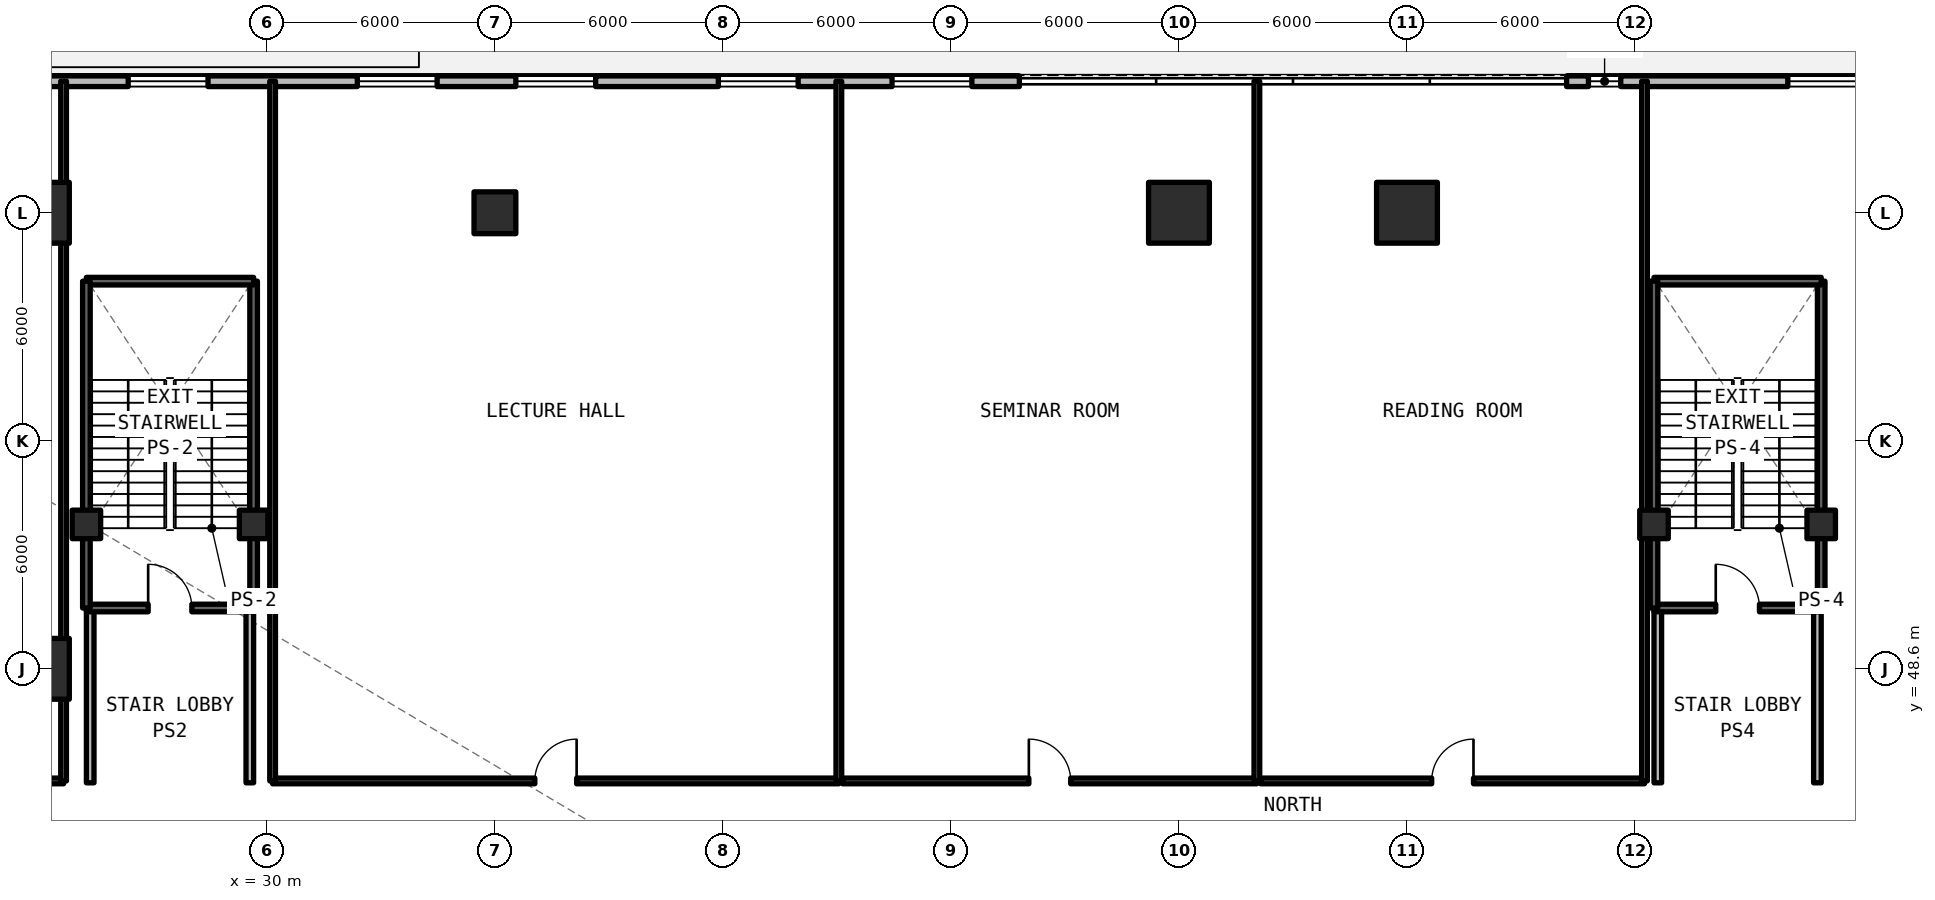
"""IFC4 building model, lengths in metres.
Left out: names, types, materials, properties, quantities, classifications, styles, units other than length and angle.
Written with IfcOpenShell. Run it as: python <this file> out.ifc"""

import sys

from ifc_helpers import new_model, si_unit, direction, frame, frame_2d, origin, origin_2d, place, context, subcontext, project, spatial, rectangle, circle, extrude, element, fill, save


model = new_model("IFC4")
c1 = context("Model", 3, precision=1e-05, world=origin(), true_north=direction((0.0, 1.0)))
c2 = subcontext(c1, "Body", "Model", "MODEL_VIEW")
j1 = project(units=[si_unit("LENGTHUNIT", "METRE"), si_unit("PLANEANGLEUNIT", "RADIAN")], contexts=[c1])
p1 = place(None, origin())
s1 = spatial("IfcSite", under=j1, at=p1, CompositionType="ELEMENT")
p2 = place(p1, origin())
s2 = spatial("IfcBuilding", under=s1, at=p2, CompositionType="ELEMENT")
p3 = place(p2, frame((0.0, 0.0, 14.85)))
s3 = spatial("IfcBuildingStorey", under=s2, at=p3, CompositionType="ELEMENT", Elevation=14.85)
p4 = place(p3, frame((24.0, 60.6, 0.0), z_axis=(0.0, 0.0, 1.0), x_axis=(1.0, 0.0, 0.0)))
e1 = element("IfcColumn", 1, at=p4, inside=s3, PredefinedType="COLUMN", context=c2, shape_type="SweptSolid", body=[
    extrude(rectangle(XDim=1.6, YDim=1.6, at=origin_2d()), origin(), (0.0, 0.0, 1.0), 4.62),
])
p5 = place(p3, frame((36.0, 60.6, 0.0), z_axis=(0.0, 0.0, 1.0), x_axis=(1.0, 0.0, 0.0)))
e2 = element("IfcColumn", 2, at=p5, inside=s3, PredefinedType="COLUMN", context=c2, shape_type="SweptSolid", body=[
    extrude(circle(Radius=0.55, at=origin_2d()), origin(), (0.0, 0.0, 1.0), 4.62),
])
for number, where, z_axis, x_axis in (
    (3, (54.0, 60.6, 0.0), (0.0, 0.0, 1.0), (1.0, 0.0, 0.0)),
    (4, (60.0, 60.6, 0.0), (0.0, 0.0, 1.0), (1.0, 0.0, 0.0)),
    (5, (24.0, 48.6, 0.0), (0.0, 0.0, 1.0), (1.0, 0.0, 0.0)),
):
    element("IfcColumn", number, at=place(p3, frame(where, z_axis=z_axis, x_axis=x_axis)), inside=s3, PredefinedType="COLUMN", context=c2, shape_type="SweptSolid", body=[
        extrude(rectangle(XDim=1.6, YDim=1.6, at=origin_2d()), origin(), (0.0, 0.0, 1.0), 4.62),
    ])
for number, where, z_axis, x_axis in (
    (6, (25.25, 52.4, 0.0), (0.0, 0.0, 1.0), (1.0, 0.0, 0.0)),
    (7, (29.65, 52.4, 0.0), (0.0, 0.0, 1.0), (1.0, 0.0, 0.0)),
    (8, (66.5, 52.4, 0.0), (0.0, 0.0, 1.0), (1.0, 0.0, 0.0)),
    (9, (70.9, 52.4, 0.0), (0.0, 0.0, 1.0), (1.0, 0.0, 0.0)),
):
    element("IfcColumn", number, at=place(p3, frame(where, z_axis=z_axis, x_axis=x_axis)), inside=s3, PredefinedType="COLUMN", context=c2, shape_type="SweptSolid", body=[
        extrude(rectangle(XDim=0.75, YDim=0.75, at=origin_2d()), origin(), (0.0, 0.0, 1.0), 4.62),
    ])
p6 = place(p3, frame((106.442, 64.06, 0.0), z_axis=(0.0, 0.0, 1.0), x_axis=(-1.0, 0.0, 0.0)))
e10 = element("IfcWall", 10, at=p6, inside=s3, PredefinedType="SOLIDWALL", context=c2, shape_type="SweptSolid", body=[
    extrude(rectangle(XDim=42.242, YDim=0.28, at=frame_2d((21.121, 0.0))), origin(), (0.0, 0.0, 1.0), 4.34),
])
p7 = place(p6, frame((7.75, 0.0, 0.0)))
e11 = element("IfcOpeningElement", 11, at=p7, cuts=e10, PredefinedType="OPENING", context=c2, shape_type="SweptSolid", body=[
    extrude(rectangle(XDim=1.5, YDim=2.2, at=frame_2d((0.75, 1.1))), frame((0.0, 0.15, 0.0), z_axis=(0.0, -1.0, 0.0), x_axis=(1.0, 0.0, 0.0)), (0.0, 0.0, 1.0), 0.3),
])
p8 = place(p6, frame((40.817, 0.0, 0.78)))
e12 = element("IfcOpeningElement", 12, at=p8, cuts=e10, PredefinedType="OPENING", context=c2, shape_type="SweptSolid", body=[
    extrude(rectangle(XDim=0.85, YDim=1.65, at=frame_2d((0.425, 0.825))), frame((0.0, 0.15, 0.0), z_axis=(0.0, -1.0, 0.0), x_axis=(1.0, 0.0, 0.0)), (0.0, 0.0, 1.0), 0.3),
])
p9 = place(p6, frame((15.321, 0.0, 0.78)))
e13 = element("IfcOpeningElement", 13, at=p9, cuts=e10, PredefinedType="OPENING", context=c2, shape_type="SweptSolid", body=[
    extrude(rectangle(XDim=2.1, YDim=1.66, at=frame_2d((1.05, 0.83))), frame((0.0, 0.15, 0.0), z_axis=(0.0, -1.0, 0.0), x_axis=(1.0, 0.0, 0.0)), (0.0, 0.0, 1.0), 0.3),
])
p10 = place(p6, frame((24.821, 0.0, 0.78)))
e14 = element("IfcOpeningElement", 14, at=p10, cuts=e10, PredefinedType="OPENING", context=c2, shape_type="SweptSolid", body=[
    extrude(rectangle(XDim=2.1, YDim=1.66, at=frame_2d((1.05, 0.83))), frame((0.0, 0.15, 0.0), z_axis=(0.0, -1.0, 0.0), x_axis=(1.0, 0.0, 0.0)), (0.0, 0.0, 1.0), 0.3),
])
p11 = place(p6, frame((34.321, 0.0, 0.78)))
e15 = element("IfcOpeningElement", 15, at=p11, cuts=e10, PredefinedType="OPENING", context=c2, shape_type="SweptSolid", body=[
    extrude(rectangle(XDim=2.1, YDim=1.66, at=frame_2d((1.05, 0.83))), frame((0.0, 0.15, 0.0), z_axis=(0.0, -1.0, 0.0), x_axis=(1.0, 0.0, 0.0)), (0.0, 0.0, 1.0), 0.3),
])
p12 = place(p3, frame((49.8, 64.06, 0.0), z_axis=(0.0, 0.0, 1.0), x_axis=(-1.0, 0.0, 0.0)))
e16 = element("IfcWall", 16, at=p12, inside=s3, PredefinedType="SOLIDWALL", context=c2, shape_type="SweptSolid", body=[
    extrude(rectangle(XDim=42.242, YDim=0.28, at=frame_2d((21.121, 0.0))), origin(), (0.0, 0.0, 1.0), 4.34),
])
p13 = place(p12, frame((32.25, 0.0, 0.78)))
e17 = element("IfcOpeningElement", 17, at=p13, cuts=e16, PredefinedType="OPENING", context=c2, shape_type="SweptSolid", body=[
    extrude(rectangle(XDim=2.1, YDim=1.66, at=frame_2d((1.05, 0.83))), frame((0.0, 0.15, 0.0), z_axis=(0.0, -1.0, 0.0), x_axis=(1.0, 0.0, 0.0)), (0.0, 0.0, 1.0), 0.3),
])
p14 = place(p12, frame((11.15, 0.0, 0.78)))
e18 = element("IfcOpeningElement", 18, at=p14, cuts=e16, PredefinedType="OPENING", context=c2, shape_type="SweptSolid", body=[
    extrude(rectangle(XDim=2.1, YDim=1.66, at=frame_2d((1.05, 0.83))), frame((0.0, 0.15, 0.0), z_axis=(0.0, -1.0, 0.0), x_axis=(1.0, 0.0, 0.0)), (0.0, 0.0, 1.0), 0.3),
])
p15 = place(p12, frame((1.25, 0.0, 0.78)))
e19 = element("IfcOpeningElement", 19, at=p15, cuts=e16, PredefinedType="OPENING", context=c2, shape_type="SweptSolid", body=[
    extrude(rectangle(XDim=2.1, YDim=1.66, at=frame_2d((1.05, 0.83))), frame((0.0, 0.15, 0.0), z_axis=(0.0, -1.0, 0.0), x_axis=(1.0, 0.0, 0.0)), (0.0, 0.0, 1.0), 0.3),
])
p16 = place(p12, frame((21.35, 0.0, 0.78)))
e20 = element("IfcOpeningElement", 20, at=p16, cuts=e16, PredefinedType="OPENING", context=c2, shape_type="SweptSolid", body=[
    extrude(rectangle(XDim=2.1, YDim=1.66, at=frame_2d((1.05, 0.83))), frame((0.0, 0.15, 0.0), z_axis=(0.0, -1.0, 0.0), x_axis=(1.0, 0.0, 0.0)), (0.0, 0.0, 1.0), 0.3),
])
p17 = place(p12, frame((5.821, 0.0, 0.78)))
e21 = element("IfcOpeningElement", 21, at=p17, cuts=e16, PredefinedType="OPENING", context=c2, shape_type="SweptSolid", body=[
    extrude(rectangle(XDim=2.1, YDim=1.66, at=frame_2d((1.05, 0.83))), frame((0.0, 0.15, 0.0), z_axis=(0.0, -1.0, 0.0), x_axis=(1.0, 0.0, 0.0)), (0.0, 0.0, 1.0), 0.3),
])
p18 = place(p12, frame((15.321, 0.0, 0.78)))
e22 = element("IfcOpeningElement", 22, at=p18, cuts=e16, PredefinedType="OPENING", context=c2, shape_type="SweptSolid", body=[
    extrude(rectangle(XDim=2.1, YDim=1.66, at=frame_2d((1.05, 0.83))), frame((0.0, 0.15, 0.0), z_axis=(0.0, -1.0, 0.0), x_axis=(1.0, 0.0, 0.0)), (0.0, 0.0, 1.0), 0.3),
])
for number, where, z_axis, x_axis in (
    (23, (25.35, 45.6, 0.0), (0.0, 0.0, 1.0), (0.0, 1.0, 0.0)),
    (24, (29.55, 45.6, 0.0), (0.0, 0.0, 1.0), (0.0, 1.0, 0.0)),
    (25, (66.6, 45.6, 0.0), (0.0, 0.0, 1.0), (0.0, 1.0, 0.0)),
    (26, (70.8, 45.6, 0.0), (0.0, 0.0, 1.0), (0.0, 1.0, 0.0)),
):
    element("IfcWall", number, at=place(p3, frame(where, z_axis=z_axis, x_axis=x_axis)), inside=s3, PredefinedType="SOLIDWALL", context=c2, shape_type="SweptSolid", body=[
        extrude(rectangle(XDim=4.6, YDim=0.2, at=frame_2d((2.3, 0.0))), origin(), (0.0, 0.0, 1.0), 3.56),
    ])
p19 = place(p3, frame((8.35, 45.65, 0.0), z_axis=(0.0, 0.0, 1.0), x_axis=(1.0, 0.0, 0.0)))
e27 = element("IfcWall", 27, at=p19, inside=s3, PredefinedType="SOLIDWALL", context=c2, shape_type="SweptSolid", body=[
    extrude(rectangle(XDim=16.3, YDim=0.15, at=frame_2d((8.15, 0.0))), origin(), (0.0, 0.0, 1.0), 3.56),
])
p20 = place(p19, frame((7.6, 0.0, 0.0)))
e28 = element("IfcOpeningElement", 28, at=p20, cuts=e27, PredefinedType="OPENING", context=c2, shape_type="SweptSolid", body=[
    extrude(rectangle(XDim=1.1, YDim=2.15, at=frame_2d((0.55, 1.075))), frame((0.0, 0.085, 0.0), z_axis=(0.0, -1.0, 0.0), x_axis=(1.0, 0.0, 0.0)), (0.0, 0.0, 1.0), 0.17),
])
p21 = place(p3, frame((24.65, 45.65, 0.0), z_axis=(0.0, 0.0, 1.0), x_axis=(0.0, 1.0, 0.0)))
e29 = element("IfcWall", 29, at=p21, inside=s3, PredefinedType="SOLIDWALL", context=c2, shape_type="SweptSolid", body=[
    extrude(rectangle(XDim=18.41, YDim=0.15, at=frame_2d((9.205, 0.0))), origin(), (0.0, 0.0, 1.0), 3.56),
])
p22 = place(p3, frame((30.15, 45.65, 0.0), z_axis=(0.0, 0.0, 1.0), x_axis=(1.0, 0.0, 0.0)))
e30 = element("IfcWall", 30, at=p22, inside=s3, PredefinedType="SOLIDWALL", context=c2, shape_type="SweptSolid", body=[
    extrude(rectangle(XDim=14.9, YDim=0.15, at=frame_2d((7.45, 0.0))), origin(), (0.0, 0.0, 1.0), 3.56),
])
p23 = place(p22, frame((6.9, 0.0, 0.0)))
e31 = element("IfcOpeningElement", 31, at=p23, cuts=e30, PredefinedType="OPENING", context=c2, shape_type="SweptSolid", body=[
    extrude(rectangle(XDim=1.1, YDim=2.15, at=frame_2d((0.55, 1.075))), frame((0.0, 0.085, 0.0), z_axis=(0.0, -1.0, 0.0), x_axis=(1.0, 0.0, 0.0)), (0.0, 0.0, 1.0), 0.17),
])
for number, where, z_axis, x_axis in (
    (32, (30.15, 45.65, 0.0), (0.0, 0.0, 1.0), (0.0, 1.0, 0.0)),
    (33, (45.05, 45.65, 0.0), (0.0, 0.0, 1.0), (0.0, 1.0, 0.0)),
):
    element("IfcWall", number, at=place(p3, frame(where, z_axis=z_axis, x_axis=x_axis)), inside=s3, PredefinedType="SOLIDWALL", context=c2, shape_type="SweptSolid", body=[
        extrude(rectangle(XDim=18.41, YDim=0.15, at=frame_2d((9.205, 0.0))), origin(), (0.0, 0.0, 1.0), 3.56),
    ])
p24 = place(p3, frame((45.15, 45.65, 0.0), z_axis=(0.0, 0.0, 1.0), x_axis=(1.0, 0.0, 0.0)))
e34 = element("IfcWall", 34, at=p24, inside=s3, PredefinedType="SOLIDWALL", context=c2, shape_type="SweptSolid", body=[
    extrude(rectangle(XDim=10.9, YDim=0.15, at=frame_2d((5.45, 0.0))), origin(), (0.0, 0.0, 1.0), 3.56),
])
p25 = place(p24, frame((4.9, 0.0, 0.0)))
e35 = element("IfcOpeningElement", 35, at=p25, cuts=e34, PredefinedType="OPENING", context=c2, shape_type="SweptSolid", body=[
    extrude(rectangle(XDim=1.1, YDim=2.15, at=frame_2d((0.55, 1.075))), frame((0.0, 0.085, 0.0), z_axis=(0.0, -1.0, 0.0), x_axis=(1.0, 0.0, 0.0)), (0.0, 0.0, 1.0), 0.17),
])
p26 = place(p3, frame((56.05, 45.65, 0.0), z_axis=(0.0, 0.0, 1.0), x_axis=(0.0, 1.0, 0.0)))
e36 = element("IfcWall", 36, at=p26, inside=s3, PredefinedType="SOLIDWALL", context=c2, shape_type="SweptSolid", body=[
    extrude(rectangle(XDim=18.41, YDim=0.15, at=frame_2d((9.205, 0.0))), origin(), (0.0, 0.0, 1.0), 3.56),
])
p27 = place(p3, frame((56.15, 45.65, 0.0), z_axis=(0.0, 0.0, 1.0), x_axis=(1.0, 0.0, 0.0)))
e37 = element("IfcWall", 37, at=p27, inside=s3, PredefinedType="SOLIDWALL", context=c2, shape_type="SweptSolid", body=[
    extrude(rectangle(XDim=10.1, YDim=0.15, at=frame_2d((5.05, 0.0))), origin(), (0.0, 0.0, 1.0), 3.56),
])
p28 = place(p27, frame((4.5, 0.0, 0.0)))
e38 = element("IfcOpeningElement", 38, at=p28, cuts=e37, PredefinedType="OPENING", context=c2, shape_type="SweptSolid", body=[
    extrude(rectangle(XDim=1.1, YDim=2.15, at=frame_2d((0.55, 1.075))), frame((0.0, 0.085, 0.0), z_axis=(0.0, -1.0, 0.0), x_axis=(1.0, 0.0, 0.0)), (0.0, 0.0, 1.0), 0.17),
])
p29 = place(p3, frame((66.25, 45.65, 0.0), z_axis=(0.0, 0.0, 1.0), x_axis=(0.0, 1.0, 0.0)))
e39 = element("IfcWall", 39, at=p29, inside=s3, PredefinedType="SOLIDWALL", context=c2, shape_type="SweptSolid", body=[
    extrude(rectangle(XDim=18.41, YDim=0.15, at=frame_2d((9.205, 0.0))), origin(), (0.0, 0.0, 1.0), 3.56),
])
p30 = place(p3, frame((25.25, 50.2, 0.0), z_axis=(0.0, 0.0, 1.0), x_axis=(1.0, 0.0, 0.0)))
e40 = element("IfcWall", 40, at=p30, inside=s3, PredefinedType="SOLIDWALL", context=c2, shape_type="SweptSolid", body=[
    extrude(rectangle(XDim=4.4, YDim=0.2, at=frame_2d((2.2, 0.0))), origin(), (0.0, 0.0, 1.0), 4.62),
])
p31 = place(p30, frame((1.625, 0.0, 0.0)))
e41 = element("IfcOpeningElement", 41, at=p31, cuts=e40, PredefinedType="OPENING", context=c2, shape_type="SweptSolid", body=[
    extrude(rectangle(XDim=1.15, YDim=2.15, at=frame_2d((0.575, 1.075))), frame((0.0, 0.11, 0.0), z_axis=(0.0, -1.0, 0.0), x_axis=(1.0, 0.0, 0.0)), (0.0, 0.0, 1.0), 0.22),
])
p32 = place(p3, frame((29.65, 50.2, 0.0), z_axis=(0.0, 0.0, 1.0), x_axis=(0.0, 1.0, 0.0)))
e42 = element("IfcWall", 42, at=p32, inside=s3, PredefinedType="SOLIDWALL", context=c2, shape_type="SweptSolid", body=[
    extrude(rectangle(XDim=8.6, YDim=0.2, at=frame_2d((4.3, 0.0))), origin(), (0.0, 0.0, 1.0), 4.62),
])
p33 = place(p3, frame((29.65, 58.8, 0.0), z_axis=(0.0, 0.0, 1.0), x_axis=(-1.0, 0.0, 0.0)))
e43 = element("IfcWall", 43, at=p33, inside=s3, PredefinedType="SOLIDWALL", context=c2, shape_type="SweptSolid", body=[
    extrude(rectangle(XDim=4.4, YDim=0.2, at=frame_2d((2.2, 0.0))), origin(), (0.0, 0.0, 1.0), 4.62),
])
p34 = place(p3, frame((25.25, 58.8, 0.0), z_axis=(0.0, 0.0, 1.0), x_axis=(0.0, -1.0, 0.0)))
e44 = element("IfcWall", 44, at=p34, inside=s3, PredefinedType="SOLIDWALL", context=c2, shape_type="SweptSolid", body=[
    extrude(rectangle(XDim=8.6, YDim=0.2, at=frame_2d((4.3, 0.0))), origin(), (0.0, 0.0, 1.0), 4.62),
])
p35 = place(p3, frame((66.5, 50.2, 0.0), z_axis=(0.0, 0.0, 1.0), x_axis=(1.0, 0.0, 0.0)))
e45 = element("IfcWall", 45, at=p35, inside=s3, PredefinedType="SOLIDWALL", context=c2, shape_type="SweptSolid", body=[
    extrude(rectangle(XDim=4.4, YDim=0.2, at=frame_2d((2.2, 0.0))), origin(), (0.0, 0.0, 1.0), 4.62),
])
p36 = place(p35, frame((1.625, 0.0, 0.0)))
e46 = element("IfcOpeningElement", 46, at=p36, cuts=e45, PredefinedType="OPENING", context=c2, shape_type="SweptSolid", body=[
    extrude(rectangle(XDim=1.15, YDim=2.15, at=frame_2d((0.575, 1.075))), frame((0.0, 0.11, 0.0), z_axis=(0.0, -1.0, 0.0), x_axis=(1.0, 0.0, 0.0)), (0.0, 0.0, 1.0), 0.22),
])
p37 = place(p3, frame((70.9, 50.2, 0.0), z_axis=(0.0, 0.0, 1.0), x_axis=(0.0, 1.0, 0.0)))
e47 = element("IfcWall", 47, at=p37, inside=s3, PredefinedType="SOLIDWALL", context=c2, shape_type="SweptSolid", body=[
    extrude(rectangle(XDim=8.6, YDim=0.2, at=frame_2d((4.3, 0.0))), origin(), (0.0, 0.0, 1.0), 4.62),
])
p38 = place(p3, frame((70.9, 58.8, 0.0), z_axis=(0.0, 0.0, 1.0), x_axis=(-1.0, 0.0, 0.0)))
e48 = element("IfcWall", 48, at=p38, inside=s3, PredefinedType="SOLIDWALL", context=c2, shape_type="SweptSolid", body=[
    extrude(rectangle(XDim=4.4, YDim=0.2, at=frame_2d((2.2, 0.0))), origin(), (0.0, 0.0, 1.0), 4.62),
])
p39 = place(p3, frame((66.5, 58.8, 0.0), z_axis=(0.0, 0.0, 1.0), x_axis=(0.0, -1.0, 0.0)))
e49 = element("IfcWall", 49, at=p39, inside=s3, PredefinedType="SOLIDWALL", context=c2, shape_type="SweptSolid", body=[
    extrude(rectangle(XDim=8.6, YDim=0.2, at=frame_2d((4.3, 0.0))), origin(), (0.0, 0.0, 1.0), 4.62),
])
p40 = place(p8, origin())
e50 = element("IfcWindow", 50, at=p40, inside=s3, PartitioningType="SINGLE_PANEL", PredefinedType="WINDOW", context=c2, shape_type="SweptSolid", body=[
    extrude(rectangle(XDim=0.85, YDim=1.65, at=frame_2d((0.425, 0.825))), frame((0.0, 0.03, 0.0), z_axis=(0.0, -1.0, 0.0), x_axis=(1.0, 0.0, 0.0)), (0.0, 0.0, 1.0), 0.06),
])
fill(e12, e50)
p41 = place(p11, origin())
e51 = element("IfcWindow", 51, at=p41, inside=s3, PartitioningType="SINGLE_PANEL", PredefinedType="WINDOW", context=c2, shape_type="SweptSolid", body=[
    extrude(rectangle(XDim=2.1, YDim=1.66, at=frame_2d((1.05, 0.83))), frame((0.0, 0.03, 0.0), z_axis=(0.0, -1.0, 0.0), x_axis=(1.0, 0.0, 0.0)), (0.0, 0.0, 1.0), 0.06),
])
fill(e15, e51)
p42 = place(p14, origin())
e52 = element("IfcWindow", 52, at=p42, inside=s3, PartitioningType="SINGLE_PANEL", PredefinedType="WINDOW", context=c2, shape_type="SweptSolid", body=[
    extrude(rectangle(XDim=2.1, YDim=1.66, at=frame_2d((1.05, 0.83))), frame((0.0, 0.03, 0.0), z_axis=(0.0, -1.0, 0.0), x_axis=(1.0, 0.0, 0.0)), (0.0, 0.0, 1.0), 0.06),
])
fill(e18, e52)
p43 = place(p15, origin())
e53 = element("IfcWindow", 53, at=p43, inside=s3, PartitioningType="SINGLE_PANEL", PredefinedType="WINDOW", context=c2, shape_type="SweptSolid", body=[
    extrude(rectangle(XDim=2.1, YDim=1.66, at=frame_2d((1.05, 0.83))), frame((0.0, 0.03, 0.0), z_axis=(0.0, -1.0, 0.0), x_axis=(1.0, 0.0, 0.0)), (0.0, 0.0, 1.0), 0.06),
])
fill(e19, e53)
p44 = place(p16, origin())
e54 = element("IfcWindow", 54, at=p44, inside=s3, PartitioningType="SINGLE_PANEL", PredefinedType="WINDOW", context=c2, shape_type="SweptSolid", body=[
    extrude(rectangle(XDim=2.1, YDim=1.66, at=frame_2d((1.05, 0.83))), frame((0.0, 0.03, 0.0), z_axis=(0.0, -1.0, 0.0), x_axis=(1.0, 0.0, 0.0)), (0.0, 0.0, 1.0), 0.06),
])
fill(e20, e54)
p45 = place(p17, origin())
e55 = element("IfcWindow", 55, at=p45, inside=s3, PartitioningType="SINGLE_PANEL", PredefinedType="WINDOW", context=c2, shape_type="SweptSolid", body=[
    extrude(rectangle(XDim=2.1, YDim=1.66, at=frame_2d((1.05, 0.83))), frame((0.0, 0.03, 0.0), z_axis=(0.0, -1.0, 0.0), x_axis=(1.0, 0.0, 0.0)), (0.0, 0.0, 1.0), 0.06),
])
fill(e21, e55)
p46 = place(p18, origin())
e56 = element("IfcWindow", 56, at=p46, inside=s3, PartitioningType="SINGLE_PANEL", PredefinedType="WINDOW", context=c2, shape_type="SweptSolid", body=[
    extrude(rectangle(XDim=2.1, YDim=1.66, at=frame_2d((1.05, 0.83))), frame((0.0, 0.03, 0.0), z_axis=(0.0, -1.0, 0.0), x_axis=(1.0, 0.0, 0.0)), (0.0, 0.0, 1.0), 0.06),
])
fill(e22, e56)
p47 = place(p23, origin())
e57 = element("IfcDoor", 57, at=p47, inside=s3, OperationType="SINGLE_SWING_RIGHT", PredefinedType="DOOR", context=c2, shape_type="SweptSolid", body=[
    extrude(rectangle(XDim=1.1, YDim=2.15, at=frame_2d((0.55, 1.075))), frame((0.0, 0.025, 0.0), z_axis=(0.0, -1.0, 0.0), x_axis=(1.0, 0.0, 0.0)), (0.0, 0.0, 1.0), 0.05),
])
fill(e31, e57)
p48 = place(p25, origin())
e58 = element("IfcDoor", 58, at=p48, inside=s3, OperationType="SINGLE_SWING_LEFT", PredefinedType="DOOR", context=c2, shape_type="SweptSolid", body=[
    extrude(rectangle(XDim=1.1, YDim=2.15, at=frame_2d((0.55, 1.075))), frame((0.0, 0.025, 0.0), z_axis=(0.0, -1.0, 0.0), x_axis=(1.0, 0.0, 0.0)), (0.0, 0.0, 1.0), 0.05),
])
fill(e35, e58)
p49 = place(p28, origin())
e59 = element("IfcDoor", 59, at=p49, inside=s3, OperationType="SINGLE_SWING_RIGHT", PredefinedType="DOOR", context=c2, shape_type="SweptSolid", body=[
    extrude(rectangle(XDim=1.1, YDim=2.15, at=frame_2d((0.55, 1.075))), frame((0.0, 0.025, 0.0), z_axis=(0.0, -1.0, 0.0), x_axis=(1.0, 0.0, 0.0)), (0.0, 0.0, 1.0), 0.05),
])
fill(e38, e59)
p50 = place(p31, origin())
e60 = element("IfcDoor", 60, at=p50, inside=s3, OperationType="SINGLE_SWING_LEFT", PredefinedType="DOOR", context=c2, shape_type="SweptSolid", body=[
    extrude(rectangle(XDim=1.15, YDim=2.15, at=frame_2d((0.575, 1.075))), frame((0.0, 0.025, 0.0), z_axis=(0.0, -1.0, 0.0), x_axis=(1.0, 0.0, 0.0)), (0.0, 0.0, 1.0), 0.05),
])
fill(e41, e60)
p51 = place(p36, origin())
e61 = element("IfcDoor", 61, at=p51, inside=s3, OperationType="SINGLE_SWING_LEFT", PredefinedType="DOOR", context=c2, shape_type="SweptSolid", body=[
    extrude(rectangle(XDim=1.15, YDim=2.15, at=frame_2d((0.575, 1.075))), frame((0.0, 0.025, 0.0), z_axis=(0.0, -1.0, 0.0), x_axis=(1.0, 0.0, 0.0)), (0.0, 0.0, 1.0), 0.05),
])
fill(e46, e61)
save(model, sys.argv[1])
